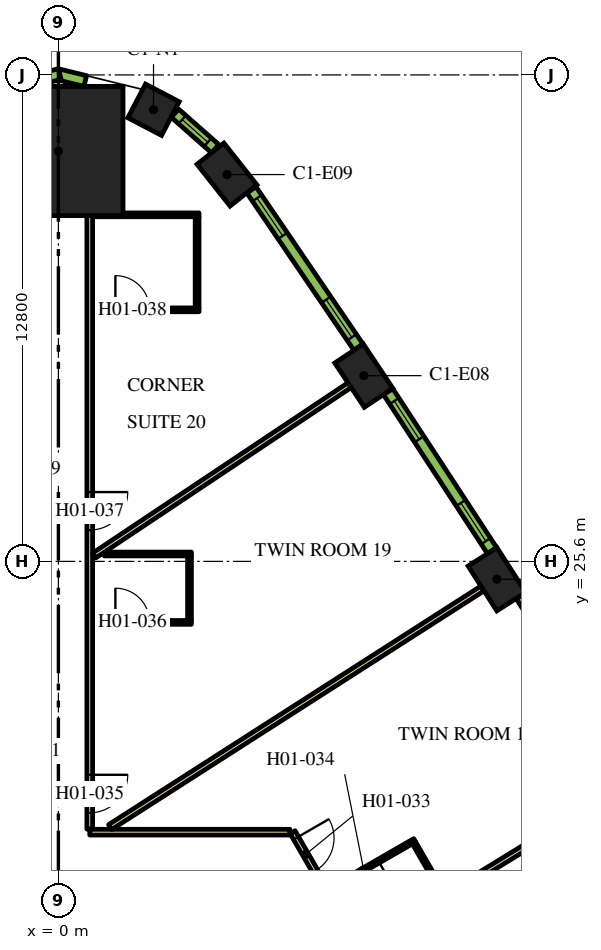
"""IFC4 building model, lengths in metres.
Left out: names, types, materials, properties, quantities, classifications, styles, units other than length and angle.
Written with IfcOpenShell. Run it as: python <this file> out.ifc"""

import sys

from ifc_helpers import new_model, si_unit, direction, frame, frame_2d, origin, origin_2d, place, context, subcontext, project, spatial, rectangle, extrude, element, fill, save


model = new_model("IFC4")
c1 = context("Model", 3, precision=1e-05, world=origin(), true_north=direction((0.0, 1.0)))
c2 = subcontext(c1, "Body", "Model", "MODEL_VIEW")
j1 = project(units=[si_unit("LENGTHUNIT", "METRE"), si_unit("PLANEANGLEUNIT", "RADIAN")], contexts=[c1])
p1 = place(None, origin())
s1 = spatial("IfcSite", under=j1, at=p1, CompositionType="ELEMENT")
p2 = place(p1, origin())
s2 = spatial("IfcBuilding", under=s1, at=p2, CompositionType="ELEMENT")
p3 = place(p2, frame((0.0, 0.0, 35.4)))
s3 = spatial("IfcBuildingStorey", under=s2, at=p3, CompositionType="ELEMENT", Elevation=35.4)
p4 = place(p3, frame((0.0, 36.399, 0.0), z_axis=(0.0, 0.0, 1.0), x_axis=(0.0, 1.0, 0.0)))
e1 = element("IfcColumn", 1, at=p4, inside=s3, PredefinedType="COLUMN", context=c2, shape_type="SweptSolid", body=[
    extrude(rectangle(XDim=3.4, YDim=3.4, at=origin_2d()), origin(), (0.0, 0.0, 1.0), 3.9),
])
for number, where, z_axis, x_axis in (
    (2, (11.539, 25.131, 0.0), (0.0, 0.0, 1.0), (-0.539, 0.842, 0.0)),
    (3, (8.037, 30.487, 0.0), (0.0, 0.0, 1.0), (-0.555, 0.832, 0.0)),
    (4, (4.436, 35.778, 0.0), (0.0, 0.0, 1.0), (-0.62, 0.784, 0.0)),
):
    element("IfcColumn", number, at=place(p3, frame(where, z_axis=z_axis, x_axis=x_axis)), inside=s3, PredefinedType="COLUMN", context=c2, shape_type="SweptSolid", body=[
        extrude(rectangle(XDim=1.4, YDim=0.9, at=origin_2d()), origin(), (0.0, 0.0, 1.0), 3.9),
    ])
p5 = place(p3, frame((2.503, 37.484, 0.0), z_axis=(0.0, 0.0, 1.0), x_axis=(-0.886067695645, 0.463555863661, 0.0)))
e5 = element("IfcColumn", 5, at=p5, inside=s3, PredefinedType="COLUMN", context=c2, shape_type="SweptSolid", body=[
    extrude(rectangle(XDim=1.0, YDim=1.0, at=origin_2d()), origin(), (0.0, 0.0, 1.0), 3.9),
])
p6 = place(p3, frame((6.163, 18.475, 0.0), z_axis=(0.0, 0.0, 1.0), x_axis=(0.500001317485, -0.866024643133, 0.0)))
e6 = element("IfcWall", 6, at=p6, inside=s3, PredefinedType="PARTITIONING", context=c2, shape_type="SweptSolid", body=[
    extrude(rectangle(XDim=25.767, YDim=0.15, at=frame_2d((12.883, 0.0))), origin(), (0.0, 0.0, 1.0), 2.75),
])
p7 = place(p6, frame((24.586, 0.0, 0.0)))
e7 = element("IfcOpeningElement", 7, at=p7, cuts=e6, PredefinedType="OPENING", context=c2, shape_type="SweptSolid", body=[
    extrude(rectangle(XDim=1.0, YDim=2.1, at=frame_2d((0.5, 1.05))), frame((0.0, 0.085, 0.0), z_axis=(0.0, -1.0, 0.0), x_axis=(1.0, 0.0, 0.0)), (0.0, 0.0, 1.0), 0.17),
])
p8 = place(p6, frame((19.319, 0.0, 0.0)))
e8 = element("IfcOpeningElement", 8, at=p8, cuts=e6, PredefinedType="OPENING", context=c2, shape_type="SweptSolid", body=[
    extrude(rectangle(XDim=1.0, YDim=2.1, at=frame_2d((0.5, 1.05))), frame((0.0, 0.085, 0.0), z_axis=(0.0, -1.0, 0.0), x_axis=(1.0, 0.0, 0.0)), (0.0, 0.0, 1.0), 0.17),
])
p9 = place(p6, frame((18.012, 0.0, 0.0)))
e9 = element("IfcOpeningElement", 9, at=p9, cuts=e6, PredefinedType="OPENING", context=c2, shape_type="SweptSolid", body=[
    extrude(rectangle(XDim=1.0, YDim=2.1, at=frame_2d((0.5, 1.05))), frame((0.0, 0.085, 0.0), z_axis=(0.0, -1.0, 0.0), x_axis=(1.0, 0.0, 0.0)), (0.0, 0.0, 1.0), 0.17),
])
p10 = place(p6, frame((6.824, 0.0, 0.0)))
e10 = element("IfcOpeningElement", 10, at=p10, cuts=e6, PredefinedType="OPENING", context=c2, shape_type="SweptSolid", body=[
    extrude(rectangle(XDim=1.1, YDim=2.1, at=frame_2d((0.55, 1.05))), frame((0.0, 0.085, 0.0), z_axis=(0.0, -1.0, 0.0), x_axis=(1.0, 0.0, 0.0)), (0.0, 0.0, 1.0), 0.17),
])
p11 = place(p6, frame((4.658, 0.0, 0.0)))
e11 = element("IfcOpeningElement", 11, at=p11, cuts=e6, PredefinedType="OPENING", context=c2, shape_type="SweptSolid", body=[
    extrude(rectangle(XDim=0.9, YDim=2.1, at=frame_2d((0.45, 1.05))), frame((0.0, 0.085, 0.0), z_axis=(0.0, -1.0, 0.0), x_axis=(1.0, 0.0, 0.0)), (0.0, 0.0, 1.0), 0.17),
])
p12 = place(p6, frame((0.18, 0.0, 0.0)))
e12 = element("IfcOpeningElement", 12, at=p12, cuts=e6, PredefinedType="OPENING", context=c2, shape_type="SweptSolid", body=[
    extrude(rectangle(XDim=1.0, YDim=2.1, at=frame_2d((0.5, 1.05))), frame((0.0, 0.085, 0.0), z_axis=(0.0, -1.0, 0.0), x_axis=(1.0, 0.0, 0.0)), (0.0, 0.0, 1.0), 0.17),
])
p13 = place(p3, frame((0.825, 18.475, 0.0), z_axis=(0.0, 0.0, 1.0), x_axis=(1.0, 0.0, 0.0)))
e13 = element("IfcWall", 13, at=p13, inside=s3, PredefinedType="PARTITIONING", context=c2, shape_type="SweptSolid", body=[
    extrude(rectangle(XDim=5.268, YDim=0.15, at=frame_2d((2.634, 0.0))), origin(), (0.0, 0.0, 1.0), 2.75),
])
p14 = place(p3, frame((0.825, 34.699, 0.0), z_axis=(0.0, 0.0, 1.0), x_axis=(0.0, -1.0, 0.0)))
e14 = element("IfcWall", 14, at=p14, inside=s3, PredefinedType="PARTITIONING", context=c2, shape_type="SweptSolid", body=[
    extrude(rectangle(XDim=16.144, YDim=0.15, at=frame_2d((8.072, 0.0))), origin(), (0.0, 0.0, 1.0), 2.75),
])
p15 = place(p14, frame((14.714, 0.0, 0.0)))
e15 = element("IfcOpeningElement", 15, at=p15, cuts=e14, PredefinedType="OPENING", context=c2, shape_type="SweptSolid", body=[
    extrude(rectangle(XDim=1.0, YDim=2.1, at=frame_2d((0.5, 1.05))), frame((0.0, 0.085, 0.0), z_axis=(0.0, -1.0, 0.0), x_axis=(1.0, 0.0, 0.0)), (0.0, 0.0, 1.0), 0.17),
])
p16 = place(p14, frame((7.275, 0.0, 0.0)))
e16 = element("IfcOpeningElement", 16, at=p16, cuts=e14, PredefinedType="OPENING", context=c2, shape_type="SweptSolid", body=[
    extrude(rectangle(XDim=1.0, YDim=2.1, at=frame_2d((0.5, 1.05))), frame((0.0, 0.085, 0.0), z_axis=(0.0, -1.0, 0.0), x_axis=(1.0, 0.0, 0.0)), (0.0, 0.0, 1.0), 0.17),
])
p17 = place(p3, frame((7.662, 30.238, 0.0), z_axis=(0.0, 0.0, 1.0), x_axis=(-0.831882886825, -0.554951225431, 0.0)))
e17 = element("IfcWall", 17, at=p17, inside=s3, PredefinedType="PARTITIONING", context=c2, shape_type="SweptSolid", body=[
    extrude(rectangle(XDim=8.079, YDim=0.15, at=frame_2d((4.04, 0.0))), origin(), (0.0, 0.0, 1.0), 2.75),
])
p18 = place(p3, frame((11.16, 24.888, 0.0), z_axis=(0.0, 0.0, 1.0), x_axis=(-0.84199813156, -0.539480441211, 0.0)))
e18 = element("IfcWall", 18, at=p18, inside=s3, PredefinedType="PARTITIONING", context=c2, shape_type="SweptSolid", body=[
    extrude(rectangle(XDim=11.638, YDim=0.15, at=frame_2d((5.819, 0.0))), origin(), (0.0, 0.0, 1.0), 2.75),
])
p19 = place(p3, frame((14.558, 19.475, 0.0), z_axis=(0.0, 0.0, 1.0), x_axis=(-0.851829455142, -0.523819223925, 0.0)))
e19 = element("IfcWall", 19, at=p19, inside=s3, PredefinedType="PARTITIONING", context=c2, shape_type="SweptSolid", body=[
    extrude(rectangle(XDim=7.688, YDim=0.15, at=frame_2d((3.844, 0.0))), origin(), (0.0, 0.0, 1.0), 2.75),
])
p20 = place(p3, frame((9.375, 18.261, 0.0), z_axis=(0.0, 0.0, 1.0), x_axis=(-0.866021400173, -0.500006934395, 0.0)))
e20 = element("IfcWall", 20, at=p20, inside=s3, PredefinedType="PARTITIONING", context=c2, shape_type="SweptSolid", body=[
    extrude(rectangle(XDim=2.6, YDim=0.1, at=frame_2d((1.3, 0.0))), origin(), (0.0, 0.0, 1.0), 2.75),
])
p21 = place(p20, frame((1.1, 0.0, 0.0)))
e21 = element("IfcOpeningElement", 21, at=p21, cuts=e20, PredefinedType="OPENING", context=c2, shape_type="SweptSolid", body=[
    extrude(rectangle(XDim=0.9, YDim=2.1, at=frame_2d((0.45, 1.05))), frame((0.0, 0.06, 0.0), z_axis=(0.0, -1.0, 0.0), x_axis=(1.0, 0.0, 0.0)), (0.0, 0.0, 1.0), 0.12),
])
p22 = place(p3, frame((9.357, 18.193, 0.0), z_axis=(0.0, 0.0, 1.0), x_axis=(0.499899694197, -0.866083307622, 0.0)))
e22 = element("IfcWall", 22, at=p22, inside=s3, PredefinedType="PARTITIONING", context=c2, shape_type="SweptSolid", body=[
    extrude(rectangle(XDim=1.55, YDim=0.1, at=frame_2d((0.775, 0.0))), origin(), (0.0, 0.0, 1.0), 2.75),
])
p23 = place(p3, frame((0.9, 23.994, 0.0), z_axis=(0.0, 0.0, 1.0), x_axis=(1.0, 0.0, 0.0)))
e23 = element("IfcWall", 23, at=p23, inside=s3, PredefinedType="PARTITIONING", context=c2, shape_type="SweptSolid", body=[
    extrude(rectangle(XDim=2.6, YDim=0.1, at=frame_2d((1.3, 0.0))), origin(), (0.0, 0.0, 1.0), 2.75),
])
p24 = place(p23, frame((0.6, 0.0, 0.0)))
e24 = element("IfcOpeningElement", 24, at=p24, cuts=e23, PredefinedType="OPENING", context=c2, shape_type="SweptSolid", body=[
    extrude(rectangle(XDim=0.9, YDim=2.1, at=frame_2d((0.45, 1.05))), frame((0.0, 0.06, 0.0), z_axis=(0.0, -1.0, 0.0), x_axis=(1.0, 0.0, 0.0)), (0.0, 0.0, 1.0), 0.12),
])
p25 = place(p3, frame((3.45, 24.044, 0.0), z_axis=(0.0, 0.0, 1.0), x_axis=(0.0, 1.0, 0.0)))
e25 = element("IfcWall", 25, at=p25, inside=s3, PredefinedType="PARTITIONING", context=c2, shape_type="SweptSolid", body=[
    extrude(rectangle(XDim=1.7, YDim=0.1, at=frame_2d((0.85, 0.0))), origin(), (0.0, 0.0, 1.0), 2.75),
])
p26 = place(p3, frame((1.21, 25.794, 0.0), z_axis=(0.0, 0.0, 1.0), x_axis=(1.0, 0.0, 0.0)))
e26 = element("IfcWall", 26, at=p26, inside=s3, PredefinedType="PARTITIONING", context=c2, shape_type="SweptSolid", body=[
    extrude(rectangle(XDim=2.29, YDim=0.1, at=frame_2d((1.145, 0.0))), origin(), (0.0, 0.0, 1.0), 2.75),
])
p27 = place(p3, frame((0.9, 32.219, 0.0), z_axis=(0.0, 0.0, 1.0), x_axis=(1.0, 0.0, 0.0)))
e27 = element("IfcWall", 27, at=p27, inside=s3, PredefinedType="PARTITIONING", context=c2, shape_type="SweptSolid", body=[
    extrude(rectangle(XDim=2.8, YDim=0.1, at=frame_2d((1.4, 0.0))), origin(), (0.0, 0.0, 1.0), 2.75),
])
p28 = place(p27, frame((0.6, 0.0, 0.0)))
e28 = element("IfcOpeningElement", 28, at=p28, cuts=e27, PredefinedType="OPENING", context=c2, shape_type="SweptSolid", body=[
    extrude(rectangle(XDim=0.9, YDim=2.1, at=frame_2d((0.45, 1.05))), frame((0.0, 0.06, 0.0), z_axis=(0.0, -1.0, 0.0), x_axis=(1.0, 0.0, 0.0)), (0.0, 0.0, 1.0), 0.12),
])
p29 = place(p3, frame((3.65, 32.269, 0.0), z_axis=(0.0, 0.0, 1.0), x_axis=(0.0, 1.0, 0.0)))
e29 = element("IfcWall", 29, at=p29, inside=s3, PredefinedType="PARTITIONING", context=c2, shape_type="SweptSolid", body=[
    extrude(rectangle(XDim=2.4, YDim=0.1, at=frame_2d((1.2, 0.0))), origin(), (0.0, 0.0, 1.0), 2.75),
])
p30 = place(p3, frame((0.9, 34.719, 0.0), z_axis=(0.0, 0.0, 1.0), x_axis=(1.0, 0.0, 0.0)))
e30 = element("IfcWall", 30, at=p30, inside=s3, PredefinedType="PARTITIONING", context=c2, shape_type="SweptSolid", body=[
    extrude(rectangle(XDim=2.8, YDim=0.1, at=frame_2d((1.4, 0.0))), origin(), (0.0, 0.0, 1.0), 2.75),
])
p31 = place(p3, frame((14.827, 20.466, 0.0), z_axis=(0.0, 0.0, 1.0), x_axis=(-0.531688286542, 0.846940119462, 0.0)))
e31 = element("IfcWall", 31, at=p31, inside=s3, PredefinedType="SOLIDWALL", context=c2, shape_type="SweptSolid", body=[
    extrude(rectangle(XDim=4.998, YDim=0.29, at=frame_2d((2.499, 0.0))), origin(), (0.0, 0.0, 1.0), 3.65),
])
p32 = place(p31, frame((0.297, 0.0, 0.9)))
e32 = element("IfcOpeningElement", 32, at=p32, cuts=e31, PredefinedType="OPENING", context=c2, shape_type="SweptSolid", body=[
    extrude(rectangle(XDim=1.2, YDim=2.15, at=frame_2d((0.6, 1.075))), frame((0.0, 0.155, 0.0), z_axis=(0.0, -1.0, 0.0), x_axis=(1.0, 0.0, 0.0)), (0.0, 0.0, 1.0), 0.31),
])
p33 = place(p31, frame((3.501, 0.0, 0.9)))
e33 = element("IfcOpeningElement", 33, at=p33, cuts=e31, PredefinedType="OPENING", context=c2, shape_type="SweptSolid", body=[
    extrude(rectangle(XDim=1.2, YDim=2.15, at=frame_2d((0.6, 1.075))), frame((0.0, 0.155, 0.0), z_axis=(0.0, -1.0, 0.0), x_axis=(1.0, 0.0, 0.0)), (0.0, 0.0, 1.0), 0.31),
])
p34 = place(p3, frame((11.411, 25.884, 0.0), z_axis=(0.0, 0.0, 1.0), x_axis=(-0.547204617628, 0.836998868845, 0.0)))
e34 = element("IfcWall", 34, at=p34, inside=s3, PredefinedType="SOLIDWALL", context=c2, shape_type="SweptSolid", body=[
    extrude(rectangle(XDim=4.998, YDim=0.29, at=frame_2d((2.499, 0.0))), origin(), (0.0, 0.0, 1.0), 3.65),
])
p35 = place(p34, frame((0.297, 0.0, 0.9)))
e35 = element("IfcOpeningElement", 35, at=p35, cuts=e34, PredefinedType="OPENING", context=c2, shape_type="SweptSolid", body=[
    extrude(rectangle(XDim=1.2, YDim=2.15, at=frame_2d((0.6, 1.075))), frame((0.0, 0.155, 0.0), z_axis=(0.0, -1.0, 0.0), x_axis=(1.0, 0.0, 0.0)), (0.0, 0.0, 1.0), 0.31),
])
p36 = place(p34, frame((3.501, 0.0, 0.9)))
e36 = element("IfcOpeningElement", 36, at=p36, cuts=e34, PredefinedType="OPENING", context=c2, shape_type="SweptSolid", body=[
    extrude(rectangle(XDim=1.2, YDim=2.15, at=frame_2d((0.6, 1.075))), frame((0.0, 0.155, 0.0), z_axis=(0.0, -1.0, 0.0), x_axis=(1.0, 0.0, 0.0)), (0.0, 0.0, 1.0), 0.31),
])
p37 = place(p3, frame((7.895, 31.238, 0.0), z_axis=(0.0, 0.0, 1.0), x_axis=(-0.562610153679, 0.826722332454, 0.0)))
e37 = element("IfcWall", 37, at=p37, inside=s3, PredefinedType="SOLIDWALL", context=c2, shape_type="SweptSolid", body=[
    extrude(rectangle(XDim=5.006, YDim=0.29, at=frame_2d((2.503, 0.0))), origin(), (0.0, 0.0, 1.0), 3.65),
])
p38 = place(p37, frame((0.31, 0.0, 0.9)))
e38 = element("IfcOpeningElement", 38, at=p38, cuts=e37, PredefinedType="OPENING", context=c2, shape_type="SweptSolid", body=[
    extrude(rectangle(XDim=1.2, YDim=2.15, at=frame_2d((0.6, 1.075))), frame((0.0, 0.155, 0.0), z_axis=(0.0, -1.0, 0.0), x_axis=(1.0, 0.0, 0.0)), (0.0, 0.0, 1.0), 0.31),
])
p39 = place(p37, frame((3.541, 0.0, 0.9)))
e39 = element("IfcOpeningElement", 39, at=p39, cuts=e37, PredefinedType="OPENING", context=c2, shape_type="SweptSolid", body=[
    extrude(rectangle(XDim=1.2, YDim=2.15, at=frame_2d((0.6, 1.075))), frame((0.0, 0.155, 0.0), z_axis=(0.0, -1.0, 0.0), x_axis=(1.0, 0.0, 0.0)), (0.0, 0.0, 1.0), 0.31),
])
p40 = place(p3, frame((4.125, 36.459, 0.0), z_axis=(0.0, 0.0, 1.0), x_axis=(-0.749812680302, 0.661650167731, 0.0)))
e40 = element("IfcWall", 40, at=p40, inside=s3, PredefinedType="SOLIDWALL", context=c2, shape_type="SweptSolid", body=[
    extrude(rectangle(XDim=1.415, YDim=0.29, at=frame_2d((0.708, 0.0))), origin(), (0.0, 0.0, 1.0), 3.65),
])
p41 = place(p40, frame((0.258, 0.0, 0.9)))
e41 = element("IfcOpeningElement", 41, at=p41, cuts=e40, PredefinedType="OPENING", context=c2, shape_type="SweptSolid", body=[
    extrude(rectangle(XDim=0.9, YDim=2.15, at=frame_2d((0.45, 1.075))), frame((0.0, 0.155, 0.0), z_axis=(0.0, -1.0, 0.0), x_axis=(1.0, 0.0, 0.0)), (0.0, 0.0, 1.0), 0.31),
])
for number, where, z_axis, x_axis in (
    (42, (0.707, 38.239, 0.0), (0.0, 0.0, 1.0), (-0.971, 0.238, 0.0)),
    (43, (0.035, 38.421, 0.0), (0.0, 0.0, 1.0), (-0.971, -0.238, 0.0)),
):
    element("IfcWall", number, at=place(p3, frame(where, z_axis=z_axis, x_axis=x_axis)), inside=s3, PredefinedType="SOLIDWALL", context=c2, shape_type="SweptSolid", body=[
        extrude(rectangle(XDim=0.764, YDim=0.29, at=frame_2d((0.382, 0.0))), origin(), (0.0, 0.0, 1.0), 3.65),
    ])
p42 = place(p12, origin())
e44 = element("IfcDoor", 44, at=p42, inside=s3, OperationType="SINGLE_SWING_LEFT", PredefinedType="DOOR", context=c2, shape_type="SweptSolid", body=[
    extrude(rectangle(XDim=1.0, YDim=2.1, at=frame_2d((0.5, 1.05))), frame((0.0, 0.025, 0.0), z_axis=(0.0, -1.0, 0.0), x_axis=(1.0, 0.0, 0.0)), (0.0, 0.0, 1.0), 0.05),
])
fill(e12, e44)
p43 = place(p21, origin())
e45 = element("IfcDoor", 45, at=p43, inside=s3, OperationType="SINGLE_SWING_RIGHT", PredefinedType="DOOR", context=c2, shape_type="SweptSolid", body=[
    extrude(rectangle(XDim=0.9, YDim=2.1, at=frame_2d((0.45, 1.05))), frame((0.0, 0.025, 0.0), z_axis=(0.0, -1.0, 0.0), x_axis=(1.0, 0.0, 0.0)), (0.0, 0.0, 1.0), 0.05),
])
fill(e21, e45)
p44 = place(p15, origin())
e46 = element("IfcDoor", 46, at=p44, inside=s3, OperationType="SINGLE_SWING_RIGHT", PredefinedType="DOOR", context=c2, shape_type="SweptSolid", body=[
    extrude(rectangle(XDim=1.0, YDim=2.1, at=frame_2d((0.5, 1.05))), frame((0.0, 0.025, 0.0), z_axis=(0.0, -1.0, 0.0), x_axis=(1.0, 0.0, 0.0)), (0.0, 0.0, 1.0), 0.05),
])
fill(e15, e46)
p45 = place(p24, origin())
e47 = element("IfcDoor", 47, at=p45, inside=s3, OperationType="SINGLE_SWING_LEFT", PredefinedType="DOOR", context=c2, shape_type="SweptSolid", body=[
    extrude(rectangle(XDim=0.9, YDim=2.1, at=frame_2d((0.45, 1.05))), frame((0.0, 0.025, 0.0), z_axis=(0.0, -1.0, 0.0), x_axis=(1.0, 0.0, 0.0)), (0.0, 0.0, 1.0), 0.05),
])
fill(e24, e47)
p46 = place(p16, origin())
e48 = element("IfcDoor", 48, at=p46, inside=s3, OperationType="SINGLE_SWING_RIGHT", PredefinedType="DOOR", context=c2, shape_type="SweptSolid", body=[
    extrude(rectangle(XDim=1.0, YDim=2.1, at=frame_2d((0.5, 1.05))), frame((0.0, 0.025, 0.0), z_axis=(0.0, -1.0, 0.0), x_axis=(1.0, 0.0, 0.0)), (0.0, 0.0, 1.0), 0.05),
])
fill(e16, e48)
p47 = place(p28, origin())
e49 = element("IfcDoor", 49, at=p47, inside=s3, OperationType="SINGLE_SWING_LEFT", PredefinedType="DOOR", context=c2, shape_type="SweptSolid", body=[
    extrude(rectangle(XDim=0.9, YDim=2.1, at=frame_2d((0.45, 1.05))), frame((0.0, 0.025, 0.0), z_axis=(0.0, -1.0, 0.0), x_axis=(1.0, 0.0, 0.0)), (0.0, 0.0, 1.0), 0.05),
])
fill(e28, e49)
p48 = place(p35, origin())
e50 = element("IfcWindow", 50, at=p48, inside=s3, PartitioningType="DOUBLE_PANEL_VERTICAL", PredefinedType="WINDOW", context=c2, shape_type="SweptSolid", body=[
    extrude(rectangle(XDim=1.2, YDim=2.15, at=frame_2d((0.6, 1.075))), frame((0.0, 0.015, 0.0), z_axis=(0.0, -1.0, 0.0), x_axis=(1.0, 0.0, 0.0)), (0.0, 0.0, 1.0), 0.06),
])
fill(e35, e50)
p49 = place(p36, origin())
e51 = element("IfcWindow", 51, at=p49, inside=s3, PartitioningType="DOUBLE_PANEL_VERTICAL", PredefinedType="WINDOW", context=c2, shape_type="SweptSolid", body=[
    extrude(rectangle(XDim=1.2, YDim=2.15, at=frame_2d((0.6, 1.075))), frame((0.0, 0.015, 0.0), z_axis=(0.0, -1.0, 0.0), x_axis=(1.0, 0.0, 0.0)), (0.0, 0.0, 1.0), 0.06),
])
fill(e36, e51)
p50 = place(p38, origin())
e52 = element("IfcWindow", 52, at=p50, inside=s3, PartitioningType="DOUBLE_PANEL_VERTICAL", PredefinedType="WINDOW", context=c2, shape_type="SweptSolid", body=[
    extrude(rectangle(XDim=1.2, YDim=2.15, at=frame_2d((0.6, 1.075))), frame((0.0, 0.015, 0.0), z_axis=(0.0, -1.0, 0.0), x_axis=(1.0, 0.0, 0.0)), (0.0, 0.0, 1.0), 0.06),
])
fill(e38, e52)
p51 = place(p39, origin())
e53 = element("IfcWindow", 53, at=p51, inside=s3, PartitioningType="DOUBLE_PANEL_VERTICAL", PredefinedType="WINDOW", context=c2, shape_type="SweptSolid", body=[
    extrude(rectangle(XDim=1.2, YDim=2.15, at=frame_2d((0.6, 1.075))), frame((0.0, 0.015, 0.0), z_axis=(0.0, -1.0, 0.0), x_axis=(1.0, 0.0, 0.0)), (0.0, 0.0, 1.0), 0.06),
])
fill(e39, e53)
p52 = place(p41, origin())
e54 = element("IfcWindow", 54, at=p52, inside=s3, PartitioningType="SINGLE_PANEL", PredefinedType="WINDOW", context=c2, shape_type="SweptSolid", body=[
    extrude(rectangle(XDim=0.9, YDim=2.15, at=frame_2d((0.45, 1.075))), frame((0.0, 0.015, 0.0), z_axis=(0.0, -1.0, 0.0), x_axis=(1.0, 0.0, 0.0)), (0.0, 0.0, 1.0), 0.06),
])
fill(e41, e54)
save(model, sys.argv[1])
